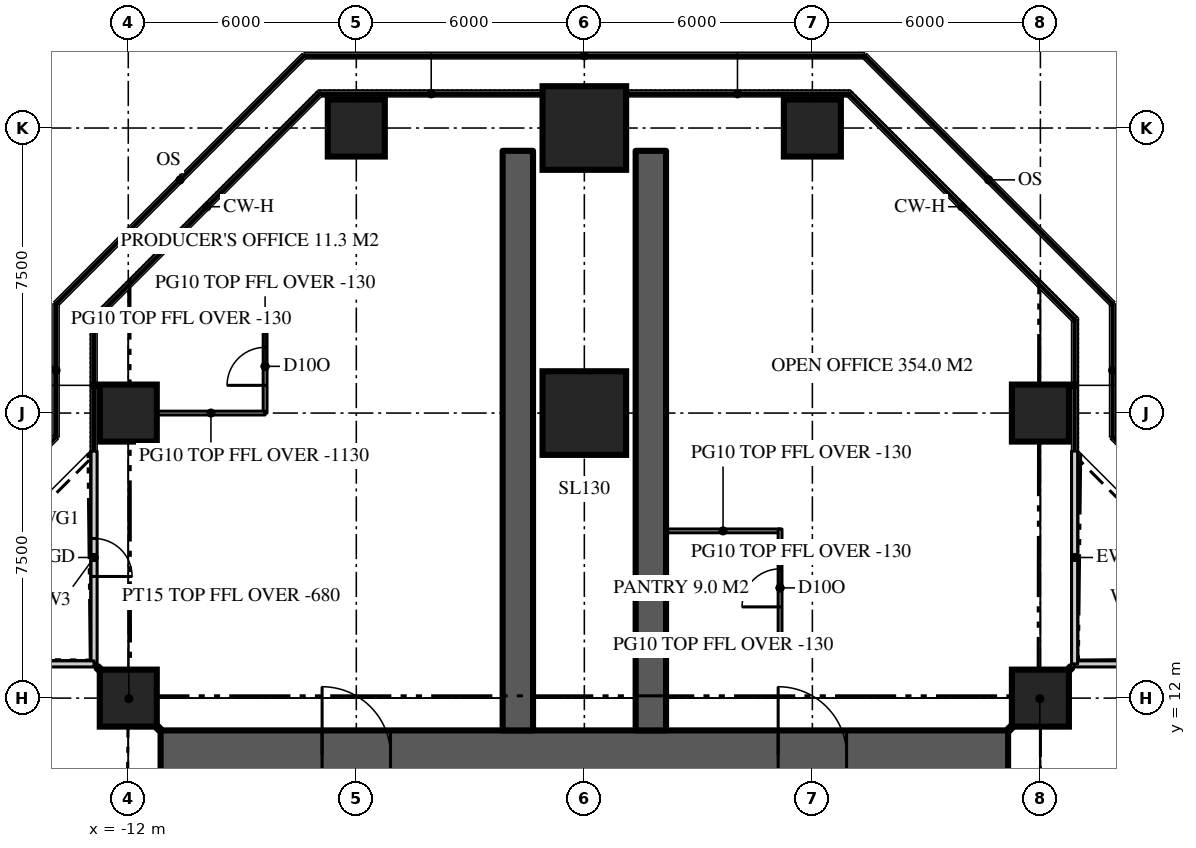
"""IFC4 building model, lengths in metres.
Left out: names, types, materials, properties, quantities, classifications, styles, units other than length and angle.
Written with IfcOpenShell. Run it as: python <this file> out.ifc"""

import sys

from ifc_helpers import new_model, si_unit, direction, frame, frame_2d, origin, origin_2d, place, context, subcontext, project, spatial, rectangle, extrude, element, fill, save


model = new_model("IFC4")
c1 = context("Model", 3, precision=1e-05, world=origin(), true_north=direction((0.0, 1.0)))
c2 = subcontext(c1, "Body", "Model", "MODEL_VIEW")
j1 = project(units=[si_unit("LENGTHUNIT", "METRE"), si_unit("PLANEANGLEUNIT", "RADIAN")], contexts=[c1])
p1 = place(None, origin())
s1 = spatial("IfcSite", under=j1, at=p1, CompositionType="ELEMENT")
p2 = place(p1, origin())
s2 = spatial("IfcBuilding", under=s1, at=p2, CompositionType="ELEMENT")
p3 = place(p2, frame((0.0, 0.0, 204.9)))
s3 = spatial("IfcBuildingStorey", under=s2, at=p3, CompositionType="ELEMENT", Elevation=204.9)
p4 = place(p3, frame((-11.15, 10.5, 0.0), z_axis=(0.0, 0.0, 1.0), x_axis=(1.0, 0.0, 0.0)))
e1 = element("IfcWall", 1, at=p4, inside=s3, PredefinedType="SHEAR", context=c2, shape_type="SweptSolid", body=[
    extrude(rectangle(XDim=22.3, YDim=1.3, at=frame_2d((11.15, 0.0))), origin(), (0.0, 0.0, 1.0), 3.9),
])
p5 = place(p4, frame((4.25, 0.0, 0.0)))
e2 = element("IfcOpeningElement", 2, at=p5, cuts=e1, PredefinedType="OPENING", context=c2, shape_type="SweptSolid", body=[
    extrude(rectangle(XDim=1.8, YDim=2.2, at=frame_2d((0.9, 1.1))), frame((0.0, 0.66, 0.0), z_axis=(0.0, -1.0, 0.0), x_axis=(1.0, 0.0, 0.0)), (0.0, 0.0, 1.0), 1.32),
])
p6 = place(p4, frame((16.25, 0.0, 0.0)))
e3 = element("IfcOpeningElement", 3, at=p6, cuts=e1, PredefinedType="OPENING", context=c2, shape_type="SweptSolid", body=[
    extrude(rectangle(XDim=1.8, YDim=2.2, at=frame_2d((0.9, 1.1))), frame((0.0, 0.66, 0.0), z_axis=(0.0, -1.0, 0.0), x_axis=(1.0, 0.0, 0.0)), (0.0, 0.0, 1.0), 1.32),
])
for number, where, z_axis, x_axis in (
    (4, (1.75, 11.15, 0.0), (0.0, 0.0, 1.0), (0.0, 1.0, 0.0)),
    (5, (-1.75, 11.15, 0.0), (0.0, 0.0, 1.0), (0.0, 1.0, 0.0)),
):
    element("IfcWall", number, at=place(p3, frame(where, z_axis=z_axis, x_axis=x_axis)), inside=s3, PredefinedType="SHEAR", context=c2, shape_type="SweptSolid", body=[
        extrude(rectangle(XDim=15.25, YDim=0.8, at=frame_2d((7.625, 0.0))), origin(), (0.0, 0.0, 1.0), 3.9),
    ])
for number, where, z_axis, x_axis in (
    (6, (-12.0, 12.0, 0.0), (0.0, 0.0, 1.0), (1.0, 0.0, 0.0)),
    (7, (12.0, 12.0, 0.0), (0.0, 0.0, 1.0), (1.0, 0.0, 0.0)),
    (8, (-12.0, 19.5, 0.0), (0.0, 0.0, 1.0), (1.0, 0.0, 0.0)),
):
    element("IfcColumn", number, at=place(p3, frame(where, z_axis=z_axis, x_axis=x_axis)), inside=s3, PredefinedType="COLUMN", context=c2, shape_type="SweptSolid", body=[
        extrude(rectangle(XDim=1.5, YDim=1.5, at=origin_2d()), origin(), (0.0, 0.0, 1.0), 3.9),
    ])
p7 = place(p3, frame((0.0, 19.5, 0.0), z_axis=(0.0, 0.0, 1.0), x_axis=(1.0, 0.0, 0.0)))
e9 = element("IfcColumn", 9, at=p7, inside=s3, PredefinedType="COLUMN", context=c2, shape_type="SweptSolid", body=[
    extrude(rectangle(XDim=2.2, YDim=2.2, at=origin_2d()), origin(), (0.0, 0.0, 1.0), 3.9),
])
for number, where, z_axis, x_axis in (
    (10, (12.0, 19.5, 0.0), (0.0, 0.0, 1.0), (1.0, 0.0, 0.0)),
    (11, (-6.0, 27.0, 0.0), (0.0, 0.0, 1.0), (1.0, 0.0, 0.0)),
):
    element("IfcColumn", number, at=place(p3, frame(where, z_axis=z_axis, x_axis=x_axis)), inside=s3, PredefinedType="COLUMN", context=c2, shape_type="SweptSolid", body=[
        extrude(rectangle(XDim=1.5, YDim=1.5, at=origin_2d()), origin(), (0.0, 0.0, 1.0), 3.9),
    ])
p8 = place(p3, frame((0.0, 27.0, 0.0), z_axis=(0.0, 0.0, 1.0), x_axis=(1.0, 0.0, 0.0)))
e12 = element("IfcColumn", 12, at=p8, inside=s3, PredefinedType="COLUMN", context=c2, shape_type="SweptSolid", body=[
    extrude(rectangle(XDim=2.2, YDim=2.2, at=origin_2d()), origin(), (0.0, 0.0, 1.0), 3.9),
])
p9 = place(p3, frame((6.0, 27.0, 0.0), z_axis=(0.0, 0.0, 1.0), x_axis=(1.0, 0.0, 0.0)))
e13 = element("IfcColumn", 13, at=p9, inside=s3, PredefinedType="COLUMN", context=c2, shape_type="SweptSolid", body=[
    extrude(rectangle(XDim=1.5, YDim=1.5, at=origin_2d()), origin(), (0.0, 0.0, 1.0), 3.9),
])
p10 = place(p3, frame((18.5, 12.9, 0.0), z_axis=(0.0, 0.0, 1.0), x_axis=(-1.0, 0.0, 0.0)))
e14 = element("IfcWall", 14, at=p10, inside=s3, PredefinedType="SOLIDWALL", context=c2, shape_type="SweptSolid", body=[
    extrude(rectangle(XDim=5.6, YDim=0.16, at=frame_2d((2.8, 0.0))), origin(), (0.0, 0.0, 1.0), 3.77),
])
p11 = place(p10, frame((2.3, 0.0, 0.0)))
e15 = element("IfcOpeningElement", 15, at=p11, cuts=e14, PredefinedType="OPENING", context=c2, shape_type="SweptSolid", body=[
    extrude(rectangle(XDim=1.0, YDim=2.2, at=frame_2d((0.5, 1.1))), frame((0.0, 0.09, 0.0), z_axis=(0.0, -1.0, 0.0), x_axis=(1.0, 0.0, 0.0)), (0.0, 0.0, 1.0), 0.18),
])
p12 = place(p3, frame((12.9, 12.9, 0.0), z_axis=(0.0, 0.0, 1.0), x_axis=(0.0, 1.0, 0.0)))
e16 = element("IfcWall", 16, at=p12, inside=s3, PredefinedType="SOLIDWALL", context=c2, shape_type="SweptSolid", body=[
    extrude(rectangle(XDim=5.6, YDim=0.16, at=frame_2d((2.8, 0.0))), origin(), (0.0, 0.0, 1.0), 3.77),
])
p13 = place(p3, frame((-12.9, 18.5, 0.0), z_axis=(0.0, 0.0, 1.0), x_axis=(0.0, -1.0, 0.0)))
e17 = element("IfcWall", 17, at=p13, inside=s3, PredefinedType="SOLIDWALL", context=c2, shape_type="SweptSolid", body=[
    extrude(rectangle(XDim=5.6, YDim=0.16, at=frame_2d((2.8, 0.0))), origin(), (0.0, 0.0, 1.0), 3.77),
])
p14 = place(p13, frame((2.3, 0.0, 0.0)))
e18 = element("IfcOpeningElement", 18, at=p14, cuts=e17, PredefinedType="OPENING", context=c2, shape_type="SweptSolid", body=[
    extrude(rectangle(XDim=1.0, YDim=2.2, at=frame_2d((0.5, 1.1))), frame((0.0, 0.09, 0.0), z_axis=(0.0, -1.0, 0.0), x_axis=(1.0, 0.0, 0.0)), (0.0, 0.0, 1.0), 0.18),
])
p15 = place(p3, frame((-12.9, 12.9, 0.0), z_axis=(0.0, 0.0, 1.0), x_axis=(-1.0, 0.0, 0.0)))
e19 = element("IfcWall", 19, at=p15, inside=s3, PredefinedType="SOLIDWALL", context=c2, shape_type="SweptSolid", body=[
    extrude(rectangle(XDim=5.6, YDim=0.16, at=frame_2d((2.8, 0.0))), origin(), (0.0, 0.0, 1.0), 3.77),
])
p16 = place(p3, frame((-8.4, 19.5, 0.0), z_axis=(0.0, 0.0, 1.0), x_axis=(0.0, 1.0, 0.0)))
e20 = element("IfcWall", 20, at=p16, inside=s3, PredefinedType="PARTITIONING", context=c2, shape_type="SweptSolid", body=[
    extrude(rectangle(XDim=2.459, YDim=0.1, at=frame_2d((1.229, 0.0))), origin(), (0.0, 0.0, 1.0), 3.77),
])
p17 = place(p16, frame((0.729, 0.0, 0.0)))
e21 = element("IfcOpeningElement", 21, at=p17, cuts=e20, PredefinedType="OPENING", context=c2, shape_type="SweptSolid", body=[
    extrude(rectangle(XDim=1.0, YDim=2.2, at=frame_2d((0.5, 1.1))), frame((0.0, 0.06, 0.0), z_axis=(0.0, -1.0, 0.0), x_axis=(1.0, 0.0, 0.0)), (0.0, 0.0, 1.0), 0.12),
])
p18 = place(p3, frame((-8.4, 19.5, 0.0), z_axis=(0.0, 0.0, 1.0), x_axis=(-1.0, 0.0, 0.0)))
e22 = element("IfcWall", 22, at=p18, inside=s3, PredefinedType="PARTITIONING", context=c2, shape_type="SweptSolid", body=[
    extrude(rectangle(XDim=2.85, YDim=0.1, at=frame_2d((1.425, 0.0))), origin(), (0.0, 0.0, 1.0), 2.77),
])
p19 = place(p3, frame((-8.4, 21.959, 0.0), z_axis=(0.0, 0.0, 1.0), x_axis=(-1.0, 0.0, 0.0)))
e23 = element("IfcWall", 23, at=p19, inside=s3, PredefinedType="PARTITIONING", context=c2, shape_type="SweptSolid", body=[
    extrude(rectangle(XDim=4.42, YDim=0.1, at=frame_2d((2.21, 0.0))), origin(), (0.0, 0.0, 1.0), 3.77),
])
for number, where, z_axis, x_axis in (
    (24, (2.15, 13.4, 0.0), (0.0, 0.0, 1.0), (1.0, 0.0, 0.0)),
    (25, (2.15, 16.4, 0.0), (0.0, 0.0, 1.0), (1.0, 0.0, 0.0)),
):
    element("IfcWall", number, at=place(p3, frame(where, z_axis=z_axis, x_axis=x_axis)), inside=s3, PredefinedType="PARTITIONING", context=c2, shape_type="SweptSolid", body=[
        extrude(rectangle(XDim=3.0, YDim=0.1, at=frame_2d((1.5, 0.0))), origin(), (0.0, 0.0, 1.0), 3.77),
    ])
p20 = place(p3, frame((5.15, 13.35, 0.0), z_axis=(0.0, 0.0, 1.0), x_axis=(0.0, 1.0, 0.0)))
e26 = element("IfcWall", 26, at=p20, inside=s3, PredefinedType="PARTITIONING", context=c2, shape_type="SweptSolid", body=[
    extrude(rectangle(XDim=3.1, YDim=0.1, at=frame_2d((1.55, 0.0))), origin(), (0.0, 0.0, 1.0), 3.77),
])
p21 = place(p20, frame((1.05, 0.0, 0.0)))
e27 = element("IfcOpeningElement", 27, at=p21, cuts=e26, PredefinedType="OPENING", context=c2, shape_type="SweptSolid", body=[
    extrude(rectangle(XDim=1.0, YDim=2.2, at=frame_2d((0.5, 1.1))), frame((0.0, 0.06, 0.0), z_axis=(0.0, -1.0, 0.0), x_axis=(1.0, 0.0, 0.0)), (0.0, 0.0, 1.0), 0.12),
])
for number, where, z_axis, x_axis in (
    (28, (11.15, 11.15, 0.0), (0.0, 0.0, 1.0), (0.707, 0.707, 0.0)),
    (29, (-11.15, 11.15, 0.0), (0.0, 0.0, 1.0), (-0.707, 0.707, 0.0)),
):
    element("IfcWall", number, at=place(p3, frame(where, z_axis=z_axis, x_axis=x_axis)), inside=s3, PredefinedType="PARTITIONING", context=c2, shape_type="SweptSolid", body=[
        extrude(rectangle(XDim=2.362, YDim=0.15, at=frame_2d((1.181, 0.0))), origin(), (0.0, 0.0, 1.0), 3.22),
    ])
p22 = place(p14, origin())
e30 = element("IfcDoor", 30, at=p22, inside=s3, OperationType="SINGLE_SWING_RIGHT", PredefinedType="DOOR", context=c2, shape_type="SweptSolid", body=[
    extrude(rectangle(XDim=1.0, YDim=2.2, at=frame_2d((0.5, 1.1))), frame((0.0, 0.025, 0.0), z_axis=(0.0, -1.0, 0.0), x_axis=(1.0, 0.0, 0.0)), (0.0, 0.0, 1.0), 0.05),
])
fill(e18, e30)
p23 = place(p5, origin())
e31 = element("IfcDoor", 31, at=p23, inside=s3, OperationType="DOUBLE_DOOR_DOUBLE_SWING", PredefinedType="DOOR", context=c2, shape_type="SweptSolid", body=[
    extrude(rectangle(XDim=1.8, YDim=2.2, at=frame_2d((0.9, 1.1))), frame((0.0, 0.025, 0.0), z_axis=(0.0, -1.0, 0.0), x_axis=(1.0, 0.0, 0.0)), (0.0, 0.0, 1.0), 0.05),
])
fill(e2, e31)
p24 = place(p6, origin())
e32 = element("IfcDoor", 32, at=p24, inside=s3, OperationType="DOUBLE_DOOR_DOUBLE_SWING", PredefinedType="DOOR", context=c2, shape_type="SweptSolid", body=[
    extrude(rectangle(XDim=1.8, YDim=2.2, at=frame_2d((0.9, 1.1))), frame((0.0, 0.025, 0.0), z_axis=(0.0, -1.0, 0.0), x_axis=(1.0, 0.0, 0.0)), (0.0, 0.0, 1.0), 0.05),
])
fill(e3, e32)
p25 = place(p17, origin())
e33 = element("IfcDoor", 33, at=p25, inside=s3, OperationType="SINGLE_SWING_LEFT", PredefinedType="DOOR", context=c2, shape_type="SweptSolid", body=[
    extrude(rectangle(XDim=1.0, YDim=2.2, at=frame_2d((0.5, 1.1))), frame((0.0, 0.025, 0.0), z_axis=(0.0, -1.0, 0.0), x_axis=(1.0, 0.0, 0.0)), (0.0, 0.0, 1.0), 0.05),
])
fill(e21, e33)
p26 = place(p21, origin())
e34 = element("IfcDoor", 34, at=p26, inside=s3, OperationType="SINGLE_SWING_LEFT", PredefinedType="DOOR", context=c2, shape_type="SweptSolid", body=[
    extrude(rectangle(XDim=1.0, YDim=2.2, at=frame_2d((0.5, 1.1))), frame((0.0, 0.025, 0.0), z_axis=(0.0, -1.0, 0.0), x_axis=(1.0, 0.0, 0.0)), (0.0, 0.0, 1.0), 0.05),
])
fill(e27, e34)
save(model, sys.argv[1])
